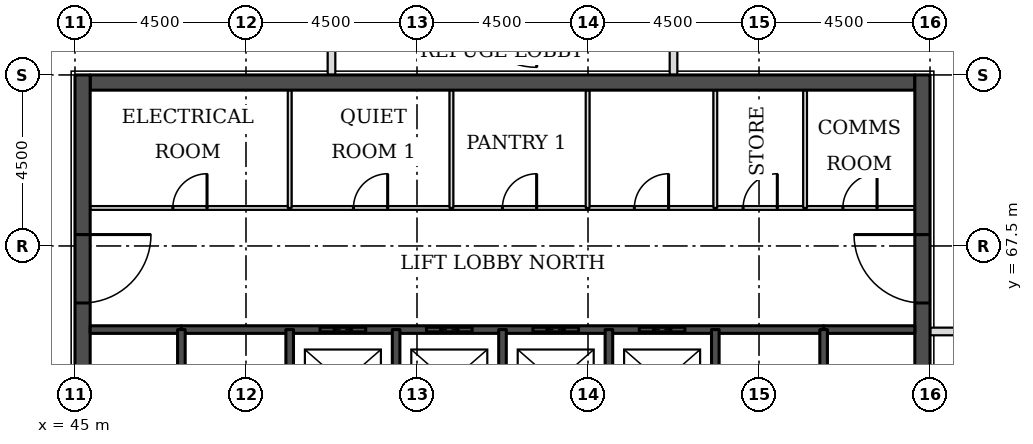
"""IFC4 building model, lengths in metres.
Left out: names, types, materials, properties, quantities, classifications, styles, units other than length and angle.
Written with IfcOpenShell. Run it as: python <this file> out.ifc"""

import sys

from ifc_helpers import new_model, si_unit, direction, frame, frame_2d, origin, place, context, subcontext, project, spatial, rectangle, extrude, element, fill, save


model = new_model("IFC4")
c1 = context("Model", 3, precision=1e-05, world=origin(), true_north=direction((0.0, 1.0)))
c2 = subcontext(c1, "Body", "Model", "MODEL_VIEW")
j1 = project(units=[si_unit("LENGTHUNIT", "METRE"), si_unit("PLANEANGLEUNIT", "RADIAN")], contexts=[c1])
p1 = place(None, origin())
s1 = spatial("IfcSite", under=j1, at=p1, CompositionType="ELEMENT")
p2 = place(p1, origin())
s2 = spatial("IfcBuilding", under=s1, at=p2, CompositionType="ELEMENT")
p3 = place(p2, frame((0.0, 0.0, 206.9)))
s3 = spatial("IfcBuildingStorey", under=s2, at=p3, CompositionType="ELEMENT", Elevation=206.9)
p4 = place(p3, frame((45.4, 71.8, 0.0), z_axis=(0.0, 0.0, 1.0), x_axis=(1.0, 0.0, 0.0)))
e1 = element("IfcWall", 1, at=p4, inside=s3, PredefinedType="SHEAR", context=c2, shape_type="SweptSolid", body=[
    extrude(rectangle(XDim=21.7, YDim=0.4, at=frame_2d((10.85, 0.0))), origin(), (0.0, 0.0, 1.0), 5.0),
])
p5 = place(p3, frame((45.2, 49.5, 0.0), z_axis=(0.0, 0.0, 1.0), x_axis=(0.0, 1.0, 0.0)))
e2 = element("IfcWall", 2, at=p5, inside=s3, PredefinedType="SHEAR", context=c2, shape_type="SweptSolid", body=[
    extrude(rectangle(XDim=22.5, YDim=0.4, at=frame_2d((11.25, 0.0))), origin(), (0.0, 0.0, 1.0), 5.0),
])
p6 = place(p5, frame((4.2, 0.0, 0.0)))
e3 = element("IfcOpeningElement", 3, at=p6, cuts=e2, PredefinedType="OPENING", context=c2, shape_type="SweptSolid", body=[
    extrude(rectangle(XDim=1.8, YDim=2.1, at=frame_2d((0.9, 1.05))), frame((0.0, 0.21, 0.0), z_axis=(0.0, -1.0, 0.0), x_axis=(1.0, 0.0, 0.0)), (0.0, 0.0, 1.0), 0.42),
])
p7 = place(p5, frame((6.9, 0.0, 0.0)))
e4 = element("IfcOpeningElement", 4, at=p7, cuts=e2, PredefinedType="OPENING", context=c2, shape_type="SweptSolid", body=[
    extrude(rectangle(XDim=1.1, YDim=2.1, at=frame_2d((0.55, 1.05))), frame((0.0, 0.21, 0.0), z_axis=(0.0, -1.0, 0.0), x_axis=(1.0, 0.0, 0.0)), (0.0, 0.0, 1.0), 0.42),
])
p8 = place(p5, frame((13.6, 0.0, 0.0)))
e5 = element("IfcOpeningElement", 5, at=p8, cuts=e2, PredefinedType="OPENING", context=c2, shape_type="SweptSolid", body=[
    extrude(rectangle(XDim=1.1, YDim=2.1, at=frame_2d((0.55, 1.05))), frame((0.0, 0.21, 0.0), z_axis=(0.0, -1.0, 0.0), x_axis=(1.0, 0.0, 0.0)), (0.0, 0.0, 1.0), 0.42),
])
p9 = place(p5, frame((16.5, 0.0, 0.0)))
e6 = element("IfcOpeningElement", 6, at=p9, cuts=e2, PredefinedType="OPENING", context=c2, shape_type="SweptSolid", body=[
    extrude(rectangle(XDim=1.8, YDim=2.1, at=frame_2d((0.9, 1.05))), frame((0.0, 0.21, 0.0), z_axis=(0.0, -1.0, 0.0), x_axis=(1.0, 0.0, 0.0)), (0.0, 0.0, 1.0), 0.42),
])
p10 = place(p3, frame((67.3, 49.5, 0.0), z_axis=(0.0, 0.0, 1.0), x_axis=(0.0, 1.0, 0.0)))
e7 = element("IfcWall", 7, at=p10, inside=s3, PredefinedType="SHEAR", context=c2, shape_type="SweptSolid", body=[
    extrude(rectangle(XDim=22.5, YDim=0.4, at=frame_2d((11.25, 0.0))), origin(), (0.0, 0.0, 1.0), 5.0),
])
p11 = place(p10, frame((4.2, 0.0, 0.0)))
e8 = element("IfcOpeningElement", 8, at=p11, cuts=e7, PredefinedType="OPENING", context=c2, shape_type="SweptSolid", body=[
    extrude(rectangle(XDim=1.8, YDim=2.1, at=frame_2d((0.9, 1.05))), frame((0.0, 0.21, 0.0), z_axis=(0.0, -1.0, 0.0), x_axis=(1.0, 0.0, 0.0)), (0.0, 0.0, 1.0), 0.42),
])
p12 = place(p10, frame((6.9, 0.0, 0.0)))
e9 = element("IfcOpeningElement", 9, at=p12, cuts=e7, PredefinedType="OPENING", context=c2, shape_type="SweptSolid", body=[
    extrude(rectangle(XDim=1.1, YDim=2.1, at=frame_2d((0.55, 1.05))), frame((0.0, 0.21, 0.0), z_axis=(0.0, -1.0, 0.0), x_axis=(1.0, 0.0, 0.0)), (0.0, 0.0, 1.0), 0.42),
])
p13 = place(p10, frame((13.6, 0.0, 0.0)))
e10 = element("IfcOpeningElement", 10, at=p13, cuts=e7, PredefinedType="OPENING", context=c2, shape_type="SweptSolid", body=[
    extrude(rectangle(XDim=1.1, YDim=2.1, at=frame_2d((0.55, 1.05))), frame((0.0, 0.21, 0.0), z_axis=(0.0, -1.0, 0.0), x_axis=(1.0, 0.0, 0.0)), (0.0, 0.0, 1.0), 0.42),
])
p14 = place(p10, frame((16.5, 0.0, 0.0)))
e11 = element("IfcOpeningElement", 11, at=p14, cuts=e7, PredefinedType="OPENING", context=c2, shape_type="SweptSolid", body=[
    extrude(rectangle(XDim=1.8, YDim=2.1, at=frame_2d((0.9, 1.05))), frame((0.0, 0.21, 0.0), z_axis=(0.0, -1.0, 0.0), x_axis=(1.0, 0.0, 0.0)), (0.0, 0.0, 1.0), 0.42),
])
for number, where, z_axis, x_axis in (
    (12, (67.5, 65.25, 0.0), (0.0, 0.0, 1.0), (1.0, 0.0, 0.0)),
    (13, (51.75, 72.0, 0.0), (0.0, 0.0, 1.0), (0.0, 1.0, 0.0)),
    (14, (60.75, 72.0, 0.0), (0.0, 0.0, 1.0), (0.0, 1.0, 0.0)),
):
    element("IfcWall", number, at=place(p3, frame(where, z_axis=z_axis, x_axis=x_axis)), inside=s3, PredefinedType="PARTITIONING", context=c2, shape_type="SweptSolid", body=[
        extrude(rectangle(XDim=2.0, YDim=0.2, at=frame_2d((1.0, 0.0))), origin(), (0.0, 0.0, 1.0), 4.85),
    ])
for number, where, z_axis, x_axis in (
    (15, (45.4, 65.3, 0.0), (0.0, 0.0, 1.0), (1.0, 0.0, 0.0)),
    (16, (64.7, 65.3, 0.0), (0.0, 0.0, 1.0), (1.0, 0.0, 0.0)),
):
    element("IfcWall", number, at=place(p3, frame(where, z_axis=z_axis, x_axis=x_axis)), inside=s3, PredefinedType="SOLIDWALL", context=c2, shape_type="SweptSolid", body=[
        extrude(rectangle(XDim=2.4, YDim=0.2, at=frame_2d((1.2, 0.0))), origin(), (0.0, 0.0, 1.0), 4.85),
    ])
p15 = place(p3, frame((47.8, 65.3, 0.0), z_axis=(0.0, 0.0, 1.0), x_axis=(1.0, 0.0, 0.0)))
e17 = element("IfcWall", 17, at=p15, inside=s3, PredefinedType="SOLIDWALL", context=c2, shape_type="SweptSolid", body=[
    extrude(rectangle(XDim=16.9, YDim=0.2, at=frame_2d((8.45, 0.0))), origin(), (0.0, 0.0, 1.0), 4.85),
])
p16 = place(p15, frame((3.65, 0.0, 0.0)))
e18 = element("IfcOpeningElement", 18, at=p16, cuts=e17, PredefinedType="OPENING", context=c2, shape_type="SweptSolid", body=[
    extrude(rectangle(XDim=1.2, YDim=2.1, at=frame_2d((0.6, 1.05))), frame((0.0, 0.11, 0.0), z_axis=(0.0, -1.0, 0.0), x_axis=(1.0, 0.0, 0.0)), (0.0, 0.0, 1.0), 0.22),
])
p17 = place(p15, frame((6.45, 0.0, 0.0)))
e19 = element("IfcOpeningElement", 19, at=p17, cuts=e17, PredefinedType="OPENING", context=c2, shape_type="SweptSolid", body=[
    extrude(rectangle(XDim=1.2, YDim=2.1, at=frame_2d((0.6, 1.05))), frame((0.0, 0.11, 0.0), z_axis=(0.0, -1.0, 0.0), x_axis=(1.0, 0.0, 0.0)), (0.0, 0.0, 1.0), 0.22),
])
p18 = place(p15, frame((9.25, 0.0, 0.0)))
e20 = element("IfcOpeningElement", 20, at=p18, cuts=e17, PredefinedType="OPENING", context=c2, shape_type="SweptSolid", body=[
    extrude(rectangle(XDim=1.2, YDim=2.1, at=frame_2d((0.6, 1.05))), frame((0.0, 0.11, 0.0), z_axis=(0.0, -1.0, 0.0), x_axis=(1.0, 0.0, 0.0)), (0.0, 0.0, 1.0), 0.22),
])
p19 = place(p15, frame((12.05, 0.0, 0.0)))
e21 = element("IfcOpeningElement", 21, at=p19, cuts=e17, PredefinedType="OPENING", context=c2, shape_type="SweptSolid", body=[
    extrude(rectangle(XDim=1.2, YDim=2.1, at=frame_2d((0.6, 1.05))), frame((0.0, 0.11, 0.0), z_axis=(0.0, -1.0, 0.0), x_axis=(1.0, 0.0, 0.0)), (0.0, 0.0, 1.0), 0.22),
])
p20 = place(p3, frame((45.4, 68.5, 0.0), z_axis=(0.0, 0.0, 1.0), x_axis=(1.0, 0.0, 0.0)))
e22 = element("IfcWall", 22, at=p20, inside=s3, PredefinedType="PARTITIONING", context=c2, shape_type="SweptSolid", body=[
    extrude(rectangle(XDim=21.7, YDim=0.1, at=frame_2d((10.85, 0.0))), origin(), (0.0, 0.0, 1.0), 4.85),
])
p21 = place(p20, frame((19.806, 0.0, 0.0)))
e23 = element("IfcOpeningElement", 23, at=p21, cuts=e22, PredefinedType="OPENING", context=c2, shape_type="SweptSolid", body=[
    extrude(rectangle(XDim=0.9, YDim=2.1, at=frame_2d((0.45, 1.05))), frame((0.0, 0.06, 0.0), z_axis=(0.0, -1.0, 0.0), x_axis=(1.0, 0.0, 0.0)), (0.0, 0.0, 1.0), 0.12),
])
p22 = place(p20, frame((17.181, 0.0, 0.0)))
e24 = element("IfcOpeningElement", 24, at=p22, cuts=e22, PredefinedType="OPENING", context=c2, shape_type="SweptSolid", body=[
    extrude(rectangle(XDim=0.9, YDim=2.1, at=frame_2d((0.45, 1.05))), frame((0.0, 0.06, 0.0), z_axis=(0.0, -1.0, 0.0), x_axis=(1.0, 0.0, 0.0)), (0.0, 0.0, 1.0), 0.12),
])
p23 = place(p20, frame((2.175, 0.0, 0.0)))
e25 = element("IfcOpeningElement", 25, at=p23, cuts=e22, PredefinedType="OPENING", context=c2, shape_type="SweptSolid", body=[
    extrude(rectangle(XDim=0.9, YDim=2.1, at=frame_2d((0.45, 1.05))), frame((0.0, 0.06, 0.0), z_axis=(0.0, -1.0, 0.0), x_axis=(1.0, 0.0, 0.0)), (0.0, 0.0, 1.0), 0.12),
])
p24 = place(p20, frame((14.32, 0.0, 0.0)))
e26 = element("IfcOpeningElement", 26, at=p24, cuts=e22, PredefinedType="OPENING", context=c2, shape_type="SweptSolid", body=[
    extrude(rectangle(XDim=0.9, YDim=2.1, at=frame_2d((0.45, 1.05))), frame((0.0, 0.06, 0.0), z_axis=(0.0, -1.0, 0.0), x_axis=(1.0, 0.0, 0.0)), (0.0, 0.0, 1.0), 0.12),
])
p25 = place(p20, frame((10.848, 0.0, 0.0)))
e27 = element("IfcOpeningElement", 27, at=p25, cuts=e22, PredefinedType="OPENING", context=c2, shape_type="SweptSolid", body=[
    extrude(rectangle(XDim=0.9, YDim=2.1, at=frame_2d((0.45, 1.05))), frame((0.0, 0.06, 0.0), z_axis=(0.0, -1.0, 0.0), x_axis=(1.0, 0.0, 0.0)), (0.0, 0.0, 1.0), 0.12),
])
p26 = place(p20, frame((6.928, 0.0, 0.0)))
e28 = element("IfcOpeningElement", 28, at=p26, cuts=e22, PredefinedType="OPENING", context=c2, shape_type="SweptSolid", body=[
    extrude(rectangle(XDim=0.9, YDim=2.1, at=frame_2d((0.45, 1.05))), frame((0.0, 0.06, 0.0), z_axis=(0.0, -1.0, 0.0), x_axis=(1.0, 0.0, 0.0)), (0.0, 0.0, 1.0), 0.12),
])
p27 = place(p3, frame((47.8, 62.0, 0.0), z_axis=(0.0, 0.0, 1.0), x_axis=(0.0, 1.0, 0.0)))
e29 = element("IfcWall", 29, at=p27, inside=s3, PredefinedType="SOLIDWALL", context=c2, shape_type="SweptSolid", body=[
    extrude(rectangle(XDim=3.3, YDim=0.2, at=frame_2d((1.65, 0.0))), origin(), (0.0, 0.0, 1.0), 4.85),
])
p28 = place(p27, frame((1.1, 0.0, 0.0)))
e30 = element("IfcOpeningElement", 30, at=p28, cuts=e29, PredefinedType="OPENING", context=c2, shape_type="SweptSolid", body=[
    extrude(rectangle(XDim=1.1, YDim=2.1, at=frame_2d((0.55, 1.05))), frame((0.0, 0.11, 0.0), z_axis=(0.0, -1.0, 0.0), x_axis=(1.0, 0.0, 0.0)), (0.0, 0.0, 1.0), 0.22),
])
p29 = place(p3, frame((50.65, 68.5, 0.0), z_axis=(0.0, 0.0, 1.0), x_axis=(0.0, 1.0, 0.0)))
e31 = element("IfcWall", 31, at=p29, inside=s3, PredefinedType="PARTITIONING", context=c2, shape_type="SweptSolid", body=[
    extrude(rectangle(XDim=3.1, YDim=0.1, at=frame_2d((1.55, 0.0))), origin(), (0.0, 0.0, 1.0), 4.85),
])
p30 = place(p3, frame((50.65, 62.0, 0.0), z_axis=(0.0, 0.0, 1.0), x_axis=(0.0, 1.0, 0.0)))
e32 = element("IfcWall", 32, at=p30, inside=s3, PredefinedType="SOLIDWALL", context=c2, shape_type="SweptSolid", body=[
    extrude(rectangle(XDim=3.3, YDim=0.2, at=frame_2d((1.65, 0.0))), origin(), (0.0, 0.0, 1.0), 4.85),
])
p31 = place(p3, frame((53.45, 62.5, 0.0), z_axis=(0.0, 0.0, 1.0), x_axis=(0.0, 1.0, 0.0)))
e33 = element("IfcWall", 33, at=p31, inside=s3, PredefinedType="SOLIDWALL", context=c2, shape_type="SweptSolid", body=[
    extrude(rectangle(XDim=2.8, YDim=0.2, at=frame_2d((1.4, 0.0))), origin(), (0.0, 0.0, 1.0), 4.85),
])
p32 = place(p3, frame((54.906, 68.5, 0.0), z_axis=(0.0, 0.0, 1.0), x_axis=(0.0, 1.0, 0.0)))
e34 = element("IfcWall", 34, at=p32, inside=s3, PredefinedType="PARTITIONING", context=c2, shape_type="SweptSolid", body=[
    extrude(rectangle(XDim=3.1, YDim=0.1, at=frame_2d((1.55, 0.0))), origin(), (0.0, 0.0, 1.0), 4.85),
])
p33 = place(p3, frame((56.25, 62.5, 0.0), z_axis=(0.0, 0.0, 1.0), x_axis=(0.0, 1.0, 0.0)))
e35 = element("IfcWall", 35, at=p33, inside=s3, PredefinedType="SOLIDWALL", context=c2, shape_type="SweptSolid", body=[
    extrude(rectangle(XDim=2.8, YDim=0.2, at=frame_2d((1.4, 0.0))), origin(), (0.0, 0.0, 1.0), 4.85),
])
p34 = place(p3, frame((58.49, 68.5, 0.0), z_axis=(0.0, 0.0, 1.0), x_axis=(0.0, 1.0, 0.0)))
e36 = element("IfcWall", 36, at=p34, inside=s3, PredefinedType="PARTITIONING", context=c2, shape_type="SweptSolid", body=[
    extrude(rectangle(XDim=3.1, YDim=0.1, at=frame_2d((1.55, 0.0))), origin(), (0.0, 0.0, 1.0), 4.85),
])
p35 = place(p3, frame((59.05, 62.5, 0.0), z_axis=(0.0, 0.0, 1.0), x_axis=(0.0, 1.0, 0.0)))
e37 = element("IfcWall", 37, at=p35, inside=s3, PredefinedType="SOLIDWALL", context=c2, shape_type="SweptSolid", body=[
    extrude(rectangle(XDim=2.8, YDim=0.2, at=frame_2d((1.4, 0.0))), origin(), (0.0, 0.0, 1.0), 4.85),
])
p36 = place(p3, frame((61.85, 68.5, 0.0), z_axis=(0.0, 0.0, 1.0), x_axis=(0.0, 1.0, 0.0)))
e38 = element("IfcWall", 38, at=p36, inside=s3, PredefinedType="PARTITIONING", context=c2, shape_type="SweptSolid", body=[
    extrude(rectangle(XDim=3.1, YDim=0.1, at=frame_2d((1.55, 0.0))), origin(), (0.0, 0.0, 1.0), 4.85),
])
p37 = place(p3, frame((61.85, 62.0, 0.0), z_axis=(0.0, 0.0, 1.0), x_axis=(0.0, 1.0, 0.0)))
e39 = element("IfcWall", 39, at=p37, inside=s3, PredefinedType="SOLIDWALL", context=c2, shape_type="SweptSolid", body=[
    extrude(rectangle(XDim=3.3, YDim=0.2, at=frame_2d((1.65, 0.0))), origin(), (0.0, 0.0, 1.0), 4.85),
])
p38 = place(p3, frame((64.212, 68.5, 0.0), z_axis=(0.0, 0.0, 1.0), x_axis=(0.0, 1.0, 0.0)))
e40 = element("IfcWall", 40, at=p38, inside=s3, PredefinedType="PARTITIONING", context=c2, shape_type="SweptSolid", body=[
    extrude(rectangle(XDim=3.1, YDim=0.1, at=frame_2d((1.55, 0.0))), origin(), (0.0, 0.0, 1.0), 4.85),
])
p39 = place(p3, frame((64.7, 62.0, 0.0), z_axis=(0.0, 0.0, 1.0), x_axis=(0.0, 1.0, 0.0)))
e41 = element("IfcWall", 41, at=p39, inside=s3, PredefinedType="SOLIDWALL", context=c2, shape_type="SweptSolid", body=[
    extrude(rectangle(XDim=3.3, YDim=0.2, at=frame_2d((1.65, 0.0))), origin(), (0.0, 0.0, 1.0), 4.85),
])
p40 = place(p39, frame((1.1, 0.0, 0.0)))
e42 = element("IfcOpeningElement", 42, at=p40, cuts=e41, PredefinedType="OPENING", context=c2, shape_type="SweptSolid", body=[
    extrude(rectangle(XDim=1.1, YDim=2.1, at=frame_2d((0.55, 1.05))), frame((0.0, 0.11, 0.0), z_axis=(0.0, -1.0, 0.0), x_axis=(1.0, 0.0, 0.0)), (0.0, 0.0, 1.0), 0.22),
])
p41 = place(p16, origin())
e43 = element("IfcDoor", 43, at=p41, inside=s3, OperationType="DOUBLE_DOOR_SLIDING", PredefinedType="DOOR", context=c2, shape_type="SweptSolid", body=[
    extrude(rectangle(XDim=1.2, YDim=2.1, at=frame_2d((0.6, 1.05))), frame((0.0, 0.025, 0.0), z_axis=(0.0, -1.0, 0.0), x_axis=(1.0, 0.0, 0.0)), (0.0, 0.0, 1.0), 0.05),
])
fill(e18, e43)
p42 = place(p17, origin())
e44 = element("IfcDoor", 44, at=p42, inside=s3, OperationType="DOUBLE_DOOR_SLIDING", PredefinedType="DOOR", context=c2, shape_type="SweptSolid", body=[
    extrude(rectangle(XDim=1.2, YDim=2.1, at=frame_2d((0.6, 1.05))), frame((0.0, 0.025, 0.0), z_axis=(0.0, -1.0, 0.0), x_axis=(1.0, 0.0, 0.0)), (0.0, 0.0, 1.0), 0.05),
])
fill(e19, e44)
p43 = place(p18, origin())
e45 = element("IfcDoor", 45, at=p43, inside=s3, OperationType="DOUBLE_DOOR_SLIDING", PredefinedType="DOOR", context=c2, shape_type="SweptSolid", body=[
    extrude(rectangle(XDim=1.2, YDim=2.1, at=frame_2d((0.6, 1.05))), frame((0.0, 0.025, 0.0), z_axis=(0.0, -1.0, 0.0), x_axis=(1.0, 0.0, 0.0)), (0.0, 0.0, 1.0), 0.05),
])
fill(e20, e45)
p44 = place(p19, origin())
e46 = element("IfcDoor", 46, at=p44, inside=s3, OperationType="DOUBLE_DOOR_SLIDING", PredefinedType="DOOR", context=c2, shape_type="SweptSolid", body=[
    extrude(rectangle(XDim=1.2, YDim=2.1, at=frame_2d((0.6, 1.05))), frame((0.0, 0.025, 0.0), z_axis=(0.0, -1.0, 0.0), x_axis=(1.0, 0.0, 0.0)), (0.0, 0.0, 1.0), 0.05),
])
fill(e21, e46)
p45 = place(p9, frame((1.8, 0.0, 0.0), z_axis=(0.0, 0.0, 1.0), x_axis=(-1.0, 0.0, 0.0)))
e47 = element("IfcDoor", 47, at=p45, inside=s3, OperationType="SINGLE_SWING_LEFT", PredefinedType="DOOR", context=c2, shape_type="SweptSolid", body=[
    extrude(rectangle(XDim=1.8, YDim=2.1, at=frame_2d((0.9, 1.05))), frame((0.0, 0.025, 0.0), z_axis=(0.0, -1.0, 0.0), x_axis=(1.0, 0.0, 0.0)), (0.0, 0.0, 1.0), 0.05),
])
fill(e6, e47)
p46 = place(p14, origin())
e48 = element("IfcDoor", 48, at=p46, inside=s3, OperationType="SINGLE_SWING_RIGHT", PredefinedType="DOOR", context=c2, shape_type="SweptSolid", body=[
    extrude(rectangle(XDim=1.8, YDim=2.1, at=frame_2d((0.9, 1.05))), frame((0.0, 0.025, 0.0), z_axis=(0.0, -1.0, 0.0), x_axis=(1.0, 0.0, 0.0)), (0.0, 0.0, 1.0), 0.05),
])
fill(e11, e48)
p47 = place(p21, origin())
e49 = element("IfcDoor", 49, at=p47, inside=s3, OperationType="SINGLE_SWING_RIGHT", PredefinedType="DOOR", context=c2, shape_type="SweptSolid", body=[
    extrude(rectangle(XDim=0.9, YDim=2.1, at=frame_2d((0.45, 1.05))), frame((0.0, 0.025, 0.0), z_axis=(0.0, -1.0, 0.0), x_axis=(1.0, 0.0, 0.0)), (0.0, 0.0, 1.0), 0.05),
])
fill(e23, e49)
p48 = place(p22, origin())
e50 = element("IfcDoor", 50, at=p48, inside=s3, OperationType="SINGLE_SWING_RIGHT", PredefinedType="DOOR", context=c2, shape_type="SweptSolid", body=[
    extrude(rectangle(XDim=0.9, YDim=2.1, at=frame_2d((0.45, 1.05))), frame((0.0, 0.025, 0.0), z_axis=(0.0, -1.0, 0.0), x_axis=(1.0, 0.0, 0.0)), (0.0, 0.0, 1.0), 0.05),
])
fill(e24, e50)
p49 = place(p23, origin())
e51 = element("IfcDoor", 51, at=p49, inside=s3, OperationType="SINGLE_SWING_RIGHT", PredefinedType="DOOR", context=c2, shape_type="SweptSolid", body=[
    extrude(rectangle(XDim=0.9, YDim=2.1, at=frame_2d((0.45, 1.05))), frame((0.0, 0.025, 0.0), z_axis=(0.0, -1.0, 0.0), x_axis=(1.0, 0.0, 0.0)), (0.0, 0.0, 1.0), 0.05),
])
fill(e25, e51)
p50 = place(p24, origin())
e52 = element("IfcDoor", 52, at=p50, inside=s3, OperationType="SINGLE_SWING_RIGHT", PredefinedType="DOOR", context=c2, shape_type="SweptSolid", body=[
    extrude(rectangle(XDim=0.9, YDim=2.1, at=frame_2d((0.45, 1.05))), frame((0.0, 0.025, 0.0), z_axis=(0.0, -1.0, 0.0), x_axis=(1.0, 0.0, 0.0)), (0.0, 0.0, 1.0), 0.05),
])
fill(e26, e52)
p51 = place(p25, origin())
e53 = element("IfcDoor", 53, at=p51, inside=s3, OperationType="SINGLE_SWING_RIGHT", PredefinedType="DOOR", context=c2, shape_type="SweptSolid", body=[
    extrude(rectangle(XDim=0.9, YDim=2.1, at=frame_2d((0.45, 1.05))), frame((0.0, 0.025, 0.0), z_axis=(0.0, -1.0, 0.0), x_axis=(1.0, 0.0, 0.0)), (0.0, 0.0, 1.0), 0.05),
])
fill(e27, e53)
p52 = place(p26, origin())
e54 = element("IfcDoor", 54, at=p52, inside=s3, OperationType="SINGLE_SWING_RIGHT", PredefinedType="DOOR", context=c2, shape_type="SweptSolid", body=[
    extrude(rectangle(XDim=0.9, YDim=2.1, at=frame_2d((0.45, 1.05))), frame((0.0, 0.025, 0.0), z_axis=(0.0, -1.0, 0.0), x_axis=(1.0, 0.0, 0.0)), (0.0, 0.0, 1.0), 0.05),
])
fill(e28, e54)
save(model, sys.argv[1])
